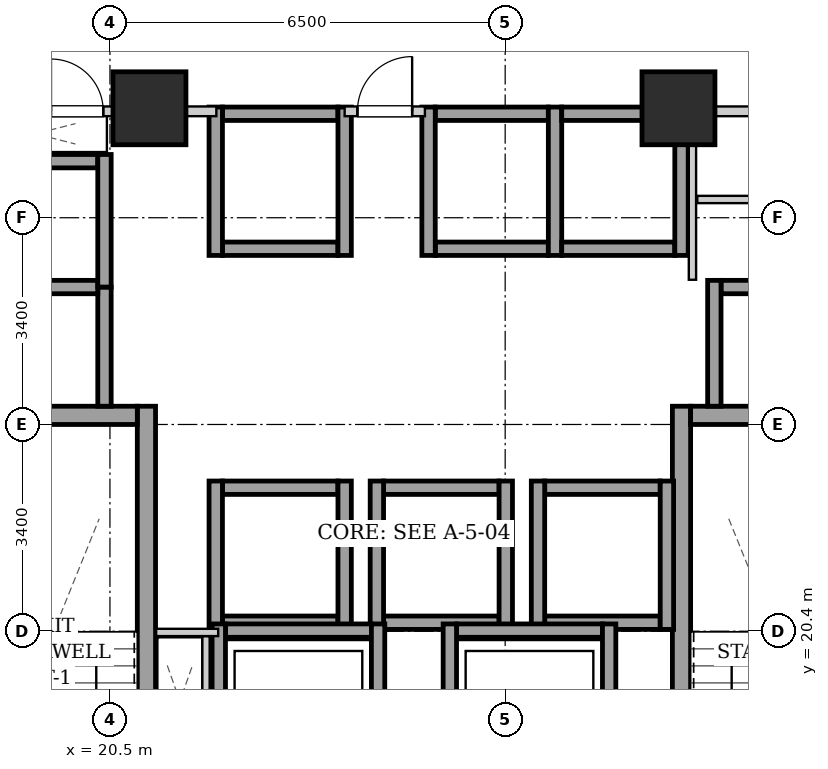
"""IFC4 building model, lengths in metres.
Left out: names, types, materials, properties, quantities, classifications, styles, units other than length and angle.
Written with IfcOpenShell. Run it as: python <this file> out.ifc"""

import sys

from ifc_helpers import new_model, si_unit, direction, frame, frame_2d, origin, origin_2d, place, context, subcontext, project, spatial, rectangle, extrude, element, fill, save


model = new_model("IFC4")
c1 = context("Model", 3, precision=1e-05, world=origin(), true_north=direction((0.0, 1.0)))
c2 = subcontext(c1, "Body", "Model", "MODEL_VIEW")
j1 = project(units=[si_unit("LENGTHUNIT", "METRE"), si_unit("PLANEANGLEUNIT", "RADIAN")], contexts=[c1])
p1 = place(None, origin())
s1 = spatial("IfcSite", under=j1, at=p1, CompositionType="ELEMENT")
p2 = place(p1, origin())
s2 = spatial("IfcBuilding", under=s1, at=p2, CompositionType="ELEMENT")
p3 = place(p2, frame((0.0, 0.0, 16.0)))
s3 = spatial("IfcBuildingStorey", under=s2, at=p3, CompositionType="ELEMENT", Elevation=16.0)
for number, where, z_axis, x_axis in (
    (1, (21.15, 29.0, 0.0), (0.0, 0.0, 1.0), (1.0, 0.0, 0.0)),
    (2, (29.85, 29.0, 0.0), (0.0, 0.0, 1.0), (1.0, 0.0, 0.0)),
):
    element("IfcColumn", number, at=place(p3, frame(where, z_axis=z_axis, x_axis=x_axis)), inside=s3, PredefinedType="COLUMN", context=c2, shape_type="SweptSolid", body=[
        extrude(rectangle(XDim=1.2, YDim=1.2, at=origin_2d()), origin(), (0.0, 0.0, 1.0), 4.8),
    ])
p4 = place(p3, frame((21.1, 15.1, 0.0), z_axis=(0.0, 0.0, 1.0), x_axis=(0.0, 1.0, 0.0)))
e3 = element("IfcWall", 3, at=p4, inside=s3, PredefinedType="SHEAR", context=c2, shape_type="SweptSolid", body=[
    extrude(rectangle(XDim=9.0, YDim=0.3, at=frame_2d((4.5, 0.0))), origin(), (0.0, 0.0, 1.0), 4.35),
])
p5 = place(p3, frame((18.1, 23.95, 0.0), z_axis=(0.0, 0.0, 1.0), x_axis=(1.0, 0.0, 0.0)))
e4 = element("IfcWall", 4, at=p5, inside=s3, PredefinedType="SHEAR", context=c2, shape_type="SweptSolid", body=[
    extrude(rectangle(XDim=2.85, YDim=0.3, at=frame_2d((1.425, 0.0))), origin(), (0.0, 0.0, 1.0), 4.35),
])
p6 = place(p3, frame((29.9, 15.1, 0.0), z_axis=(0.0, 0.0, 1.0), x_axis=(0.0, 1.0, 0.0)))
e5 = element("IfcWall", 5, at=p6, inside=s3, PredefinedType="SHEAR", context=c2, shape_type="SweptSolid", body=[
    extrude(rectangle(XDim=9.0, YDim=0.3, at=frame_2d((4.5, 0.0))), origin(), (0.0, 0.0, 1.0), 4.35),
])
p7 = place(p3, frame((30.05, 23.95, 0.0), z_axis=(0.0, 0.0, 1.0), x_axis=(1.0, 0.0, 0.0)))
e6 = element("IfcWall", 6, at=p7, inside=s3, PredefinedType="SHEAR", context=c2, shape_type="SweptSolid", body=[
    extrude(rectangle(XDim=2.85, YDim=0.3, at=frame_2d((1.425, 0.0))), origin(), (0.0, 0.0, 1.0), 4.35),
])
for number, where, z_axis, x_axis in (
    (7, (22.35, 26.69, 0.0), (0.0, 0.0, 1.0), (1.0, 0.0, 0.0)),
    (8, (22.35, 28.91, 0.0), (0.0, 0.0, 1.0), (1.0, 0.0, 0.0)),
):
    element("IfcWall", number, at=place(p3, frame(where, z_axis=z_axis, x_axis=x_axis)), inside=s3, PredefinedType="SHEAR", context=c2, shape_type="SweptSolid", body=[
        extrude(rectangle(XDim=1.9, YDim=0.22, at=frame_2d((0.95, 0.0))), origin(), (0.0, 0.0, 1.0), 4.35),
    ])
for number, where, z_axis, x_axis in (
    (9, (22.24, 26.58, 0.0), (0.0, 0.0, 1.0), (0.0, 1.0, 0.0)),
    (10, (24.36, 26.58, 0.0), (0.0, 0.0, 1.0), (0.0, 1.0, 0.0)),
):
    element("IfcWall", number, at=place(p3, frame(where, z_axis=z_axis, x_axis=x_axis)), inside=s3, PredefinedType="SHEAR", context=c2, shape_type="SweptSolid", body=[
        extrude(rectangle(XDim=2.44, YDim=0.22, at=frame_2d((1.22, 0.0))), origin(), (0.0, 0.0, 1.0), 4.35),
    ])
for number, where, z_axis, x_axis in (
    (11, (25.85, 26.69, 0.0), (0.0, 0.0, 1.0), (1.0, 0.0, 0.0)),
    (12, (25.85, 28.91, 0.0), (0.0, 0.0, 1.0), (1.0, 0.0, 0.0)),
):
    element("IfcWall", number, at=place(p3, frame(where, z_axis=z_axis, x_axis=x_axis)), inside=s3, PredefinedType="SHEAR", context=c2, shape_type="SweptSolid", body=[
        extrude(rectangle(XDim=1.86, YDim=0.22, at=frame_2d((0.93, 0.0))), origin(), (0.0, 0.0, 1.0), 4.35),
    ])
for number, where, z_axis, x_axis in (
    (13, (25.74, 26.58, 0.0), (0.0, 0.0, 1.0), (0.0, 1.0, 0.0)),
    (14, (27.82, 26.58, 0.0), (0.0, 0.0, 1.0), (0.0, 1.0, 0.0)),
):
    element("IfcWall", number, at=place(p3, frame(where, z_axis=z_axis, x_axis=x_axis)), inside=s3, PredefinedType="SHEAR", context=c2, shape_type="SweptSolid", body=[
        extrude(rectangle(XDim=2.44, YDim=0.22, at=frame_2d((1.22, 0.0))), origin(), (0.0, 0.0, 1.0), 4.35),
    ])
for number, where, z_axis, x_axis in (
    (15, (27.93, 26.69, 0.0), (0.0, 0.0, 1.0), (1.0, 0.0, 0.0)),
    (16, (27.93, 28.91, 0.0), (0.0, 0.0, 1.0), (1.0, 0.0, 0.0)),
):
    element("IfcWall", number, at=place(p3, frame(where, z_axis=z_axis, x_axis=x_axis)), inside=s3, PredefinedType="SHEAR", context=c2, shape_type="SweptSolid", body=[
        extrude(rectangle(XDim=1.86, YDim=0.22, at=frame_2d((0.93, 0.0))), origin(), (0.0, 0.0, 1.0), 4.35),
    ])
p8 = place(p3, frame((29.9, 26.58, 0.0), z_axis=(0.0, 0.0, 1.0), x_axis=(0.0, 1.0, 0.0)))
e17 = element("IfcWall", 17, at=p8, inside=s3, PredefinedType="SHEAR", context=c2, shape_type="SweptSolid", body=[
    extrude(rectangle(XDim=2.44, YDim=0.22, at=frame_2d((1.22, 0.0))), origin(), (0.0, 0.0, 1.0), 4.35),
])
for number, where, z_axis, x_axis in (
    (18, (22.35, 20.54, 0.0), (0.0, 0.0, 1.0), (1.0, 0.0, 0.0)),
    (19, (22.35, 22.76, 0.0), (0.0, 0.0, 1.0), (1.0, 0.0, 0.0)),
):
    element("IfcWall", number, at=place(p3, frame(where, z_axis=z_axis, x_axis=x_axis)), inside=s3, PredefinedType="SHEAR", context=c2, shape_type="SweptSolid", body=[
        extrude(rectangle(XDim=1.9, YDim=0.22, at=frame_2d((0.95, 0.0))), origin(), (0.0, 0.0, 1.0), 4.35),
    ])
for number, where, z_axis, x_axis in (
    (20, (22.24, 20.43, 0.0), (0.0, 0.0, 1.0), (0.0, 1.0, 0.0)),
    (21, (24.36, 20.43, 0.0), (0.0, 0.0, 1.0), (0.0, 1.0, 0.0)),
):
    element("IfcWall", number, at=place(p3, frame(where, z_axis=z_axis, x_axis=x_axis)), inside=s3, PredefinedType="SHEAR", context=c2, shape_type="SweptSolid", body=[
        extrude(rectangle(XDim=2.44, YDim=0.22, at=frame_2d((1.22, 0.0))), origin(), (0.0, 0.0, 1.0), 4.35),
    ])
for number, where, z_axis, x_axis in (
    (22, (25.0, 20.54, 0.0), (0.0, 0.0, 1.0), (1.0, 0.0, 0.0)),
    (23, (25.0, 22.76, 0.0), (0.0, 0.0, 1.0), (1.0, 0.0, 0.0)),
):
    element("IfcWall", number, at=place(p3, frame(where, z_axis=z_axis, x_axis=x_axis)), inside=s3, PredefinedType="SHEAR", context=c2, shape_type="SweptSolid", body=[
        extrude(rectangle(XDim=1.9, YDim=0.22, at=frame_2d((0.95, 0.0))), origin(), (0.0, 0.0, 1.0), 4.35),
    ])
for number, where, z_axis, x_axis in (
    (24, (24.89, 20.43, 0.0), (0.0, 0.0, 1.0), (0.0, 1.0, 0.0)),
    (25, (27.01, 20.43, 0.0), (0.0, 0.0, 1.0), (0.0, 1.0, 0.0)),
):
    element("IfcWall", number, at=place(p3, frame(where, z_axis=z_axis, x_axis=x_axis)), inside=s3, PredefinedType="SHEAR", context=c2, shape_type="SweptSolid", body=[
        extrude(rectangle(XDim=2.44, YDim=0.22, at=frame_2d((1.22, 0.0))), origin(), (0.0, 0.0, 1.0), 4.35),
    ])
for number, where, z_axis, x_axis in (
    (26, (27.65, 20.54, 0.0), (0.0, 0.0, 1.0), (1.0, 0.0, 0.0)),
    (27, (27.65, 22.76, 0.0), (0.0, 0.0, 1.0), (1.0, 0.0, 0.0)),
):
    element("IfcWall", number, at=place(p3, frame(where, z_axis=z_axis, x_axis=x_axis)), inside=s3, PredefinedType="SHEAR", context=c2, shape_type="SweptSolid", body=[
        extrude(rectangle(XDim=1.9, YDim=0.22, at=frame_2d((0.95, 0.0))), origin(), (0.0, 0.0, 1.0), 4.35),
    ])
for number, where, z_axis, x_axis in (
    (28, (27.54, 20.43, 0.0), (0.0, 0.0, 1.0), (0.0, 1.0, 0.0)),
    (29, (29.66, 20.43, 0.0), (0.0, 0.0, 1.0), (0.0, 1.0, 0.0)),
):
    element("IfcWall", number, at=place(p3, frame(where, z_axis=z_axis, x_axis=x_axis)), inside=s3, PredefinedType="SHEAR", context=c2, shape_type="SweptSolid", body=[
        extrude(rectangle(XDim=2.44, YDim=0.22, at=frame_2d((1.22, 0.0))), origin(), (0.0, 0.0, 1.0), 4.35),
    ])
p9 = place(p3, frame((20.41, 24.1, 0.0), z_axis=(0.0, 0.0, 1.0), x_axis=(0.0, 1.0, 0.0)))
e30 = element("IfcWall", 30, at=p9, inside=s3, PredefinedType="SHEAR", context=c2, shape_type="SweptSolid", body=[
    extrude(rectangle(XDim=1.96, YDim=0.22, at=frame_2d((0.98, 0.0))), origin(), (0.0, 0.0, 1.0), 4.35),
])
for number, where, z_axis, x_axis in (
    (31, (18.4, 26.06, 0.0), (0.0, 0.0, 1.0), (1.0, 0.0, 0.0)),
    (32, (18.4, 28.13, 0.0), (0.0, 0.0, 1.0), (1.0, 0.0, 0.0)),
):
    element("IfcWall", number, at=place(p3, frame(where, z_axis=z_axis, x_axis=x_axis)), inside=s3, PredefinedType="SHEAR", context=c2, shape_type="SweptSolid", body=[
        extrude(rectangle(XDim=1.9, YDim=0.22, at=frame_2d((0.95, 0.0))), origin(), (0.0, 0.0, 1.0), 4.35),
    ])
p10 = place(p3, frame((20.41, 26.06, 0.0), z_axis=(0.0, 0.0, 1.0), x_axis=(0.0, 1.0, 0.0)))
e33 = element("IfcWall", 33, at=p10, inside=s3, PredefinedType="SHEAR", context=c2, shape_type="SweptSolid", body=[
    extrude(rectangle(XDim=2.18, YDim=0.22, at=frame_2d((1.09, 0.0))), origin(), (0.0, 0.0, 1.0), 4.35),
])
p11 = place(p3, frame((30.55, 26.06, 0.0), z_axis=(0.0, 0.0, 1.0), x_axis=(1.0, 0.0, 0.0)))
e34 = element("IfcWall", 34, at=p11, inside=s3, PredefinedType="SHEAR", context=c2, shape_type="SweptSolid", body=[
    extrude(rectangle(XDim=1.9, YDim=0.22, at=frame_2d((0.95, 0.0))), origin(), (0.0, 0.0, 1.0), 4.35),
])
p12 = place(p3, frame((30.44, 24.1, 0.0), z_axis=(0.0, 0.0, 1.0), x_axis=(0.0, 1.0, 0.0)))
e35 = element("IfcWall", 35, at=p12, inside=s3, PredefinedType="SHEAR", context=c2, shape_type="SweptSolid", body=[
    extrude(rectangle(XDim=2.07, YDim=0.22, at=frame_2d((1.035, 0.0))), origin(), (0.0, 0.0, 1.0), 4.35),
])
p13 = place(p3, frame((22.4, 20.41, 0.0), z_axis=(0.0, 0.0, 1.0), x_axis=(1.0, 0.0, 0.0)))
e36 = element("IfcWall", 36, at=p13, inside=s3, PredefinedType="SHEAR", context=c2, shape_type="SweptSolid", body=[
    extrude(rectangle(XDim=2.4, YDim=0.22, at=frame_2d((1.2, 0.0))), origin(), (0.0, 0.0, 1.0), 4.35),
])
for number, where, z_axis, x_axis in (
    (37, (22.29, 17.98, 0.0), (0.0, 0.0, 1.0), (0.0, 1.0, 0.0)),
    (38, (24.91, 17.98, 0.0), (0.0, 0.0, 1.0), (0.0, 1.0, 0.0)),
):
    element("IfcWall", number, at=place(p3, frame(where, z_axis=z_axis, x_axis=x_axis)), inside=s3, PredefinedType="SHEAR", context=c2, shape_type="SweptSolid", body=[
        extrude(rectangle(XDim=2.54, YDim=0.22, at=frame_2d((1.27, 0.0))), origin(), (0.0, 0.0, 1.0), 4.35),
    ])
p14 = place(p3, frame((26.2, 20.41, 0.0), z_axis=(0.0, 0.0, 1.0), x_axis=(1.0, 0.0, 0.0)))
e39 = element("IfcWall", 39, at=p14, inside=s3, PredefinedType="SHEAR", context=c2, shape_type="SweptSolid", body=[
    extrude(rectangle(XDim=2.4, YDim=0.22, at=frame_2d((1.2, 0.0))), origin(), (0.0, 0.0, 1.0), 4.35),
])
for number, where, z_axis, x_axis in (
    (40, (26.09, 17.98, 0.0), (0.0, 0.0, 1.0), (0.0, 1.0, 0.0)),
    (41, (28.71, 17.98, 0.0), (0.0, 0.0, 1.0), (0.0, 1.0, 0.0)),
):
    element("IfcWall", number, at=place(p3, frame(where, z_axis=z_axis, x_axis=x_axis)), inside=s3, PredefinedType="SHEAR", context=c2, shape_type="SweptSolid", body=[
        extrude(rectangle(XDim=2.54, YDim=0.22, at=frame_2d((1.27, 0.0))), origin(), (0.0, 0.0, 1.0), 4.35),
    ])
p15 = place(p3, frame((24.36, 28.95, 0.0), z_axis=(0.0, 0.0, 1.0), x_axis=(1.0, 0.0, 0.0)))
e42 = element("IfcWall", 42, at=p15, inside=s3, PredefinedType="PARTITIONING", context=c2, shape_type="SweptSolid", body=[
    extrude(rectangle(XDim=1.32, YDim=0.16, at=frame_2d((0.66, 0.0))), origin(), (0.0, 0.0, 1.0), 4.35),
])
p16 = place(p15, frame((0.21, 0.0, 0.0)))
e43 = element("IfcOpeningElement", 43, at=p16, cuts=e42, PredefinedType="OPENING", context=c2, shape_type="SweptSolid", body=[
    extrude(rectangle(XDim=0.9, YDim=2.05, at=frame_2d((0.45, 1.025))), frame((0.0, 0.09, 0.0), z_axis=(0.0, -1.0, 0.0), x_axis=(1.0, 0.0, 0.0)), (0.0, 0.0, 1.0), 0.18),
])
p17 = place(p3, frame((17.96, 28.95, 0.0), z_axis=(0.0, 0.0, 1.0), x_axis=(1.0, 0.0, 0.0)))
e44 = element("IfcWall", 44, at=p17, inside=s3, PredefinedType="PARTITIONING", context=c2, shape_type="SweptSolid", body=[
    extrude(rectangle(XDim=4.29, YDim=0.16, at=frame_2d((2.145, 0.0))), origin(), (0.0, 0.0, 1.0), 4.35),
])
p18 = place(p17, frame((1.57, 0.0, 0.0)))
e45 = element("IfcOpeningElement", 45, at=p18, cuts=e44, PredefinedType="OPENING", context=c2, shape_type="SweptSolid", body=[
    extrude(rectangle(XDim=0.86, YDim=2.05, at=frame_2d((0.43, 1.025))), frame((0.0, 0.09, 0.0), z_axis=(0.0, -1.0, 0.0), x_axis=(1.0, 0.0, 0.0)), (0.0, 0.0, 1.0), 0.18),
])
p19 = place(p3, frame((22.08, 18.2, 0.0), z_axis=(0.0, 0.0, 1.0), x_axis=(0.0, 1.0, 0.0)))
e46 = element("IfcWall", 46, at=p19, inside=s3, PredefinedType="PARTITIONING", context=c2, shape_type="SweptSolid", body=[
    extrude(rectangle(XDim=2.12, YDim=0.12, at=frame_2d((1.06, 0.0))), origin(), (0.0, 0.0, 1.0), 4.35),
])
p20 = place(p3, frame((22.28, 20.38, 0.0), z_axis=(0.0, 0.0, 1.0), x_axis=(-1.0, 0.0, 0.0)))
e47 = element("IfcWall", 47, at=p20, inside=s3, PredefinedType="PARTITIONING", context=c2, shape_type="SweptSolid", body=[
    extrude(rectangle(XDim=1.02, YDim=0.12, at=frame_2d((0.51, 0.0))), origin(), (0.0, 0.0, 1.0), 4.35),
])
p21 = place(p3, frame((30.08, 26.18, 0.0), z_axis=(0.0, 0.0, 1.0), x_axis=(0.0, 1.0, 0.0)))
e48 = element("IfcWall", 48, at=p21, inside=s3, PredefinedType="PARTITIONING", context=c2, shape_type="SweptSolid", body=[
    extrude(rectangle(XDim=2.68, YDim=0.12, at=frame_2d((1.34, 0.0))), origin(), (0.0, 0.0, 1.0), 4.35),
])
p22 = place(p3, frame((30.16, 27.5, 0.0), z_axis=(0.0, 0.0, 1.0), x_axis=(1.0, 0.0, 0.0)))
e49 = element("IfcWall", 49, at=p22, inside=s3, PredefinedType="PARTITIONING", context=c2, shape_type="SweptSolid", body=[
    extrude(rectangle(XDim=2.88, YDim=0.12, at=frame_2d((1.44, 0.0))), origin(), (0.0, 0.0, 1.0), 4.35),
])
p23 = place(p22, frame((0.97, 0.0, 0.0)))
e50 = element("IfcOpeningElement", 50, at=p23, cuts=e49, PredefinedType="OPENING", context=c2, shape_type="SweptSolid", body=[
    extrude(rectangle(XDim=0.86, YDim=2.05, at=frame_2d((0.43, 1.025))), frame((0.0, 0.07, 0.0), z_axis=(0.0, -1.0, 0.0), x_axis=(1.0, 0.0, 0.0)), (0.0, 0.0, 1.0), 0.14),
])
p24 = place(p3, frame((30.08, 28.95, 0.0), z_axis=(0.0, 0.0, 1.0), x_axis=(1.0, 0.0, 0.0)))
e51 = element("IfcWall", 51, at=p24, inside=s3, PredefinedType="PARTITIONING", context=c2, shape_type="SweptSolid", body=[
    extrude(rectangle(XDim=2.96, YDim=0.16, at=frame_2d((1.48, 0.0))), origin(), (0.0, 0.0, 1.0), 4.35),
])
p25 = place(p24, frame((1.045, 0.0, 0.0)))
e52 = element("IfcOpeningElement", 52, at=p25, cuts=e51, PredefinedType="OPENING", context=c2, shape_type="SweptSolid", body=[
    extrude(rectangle(XDim=0.86, YDim=2.05, at=frame_2d((0.43, 1.025))), frame((0.0, 0.09, 0.0), z_axis=(0.0, -1.0, 0.0), x_axis=(1.0, 0.0, 0.0)), (0.0, 0.0, 1.0), 0.18),
])
p26 = place(p16, origin())
e53 = element("IfcDoor", 53, at=p26, inside=s3, OperationType="SINGLE_SWING_RIGHT", PredefinedType="DOOR", context=c2, shape_type="SweptSolid", body=[
    extrude(rectangle(XDim=0.9, YDim=2.05, at=frame_2d((0.45, 1.025))), frame((0.0, 0.025, 0.0), z_axis=(0.0, -1.0, 0.0), x_axis=(1.0, 0.0, 0.0)), (0.0, 0.0, 1.0), 0.05),
])
fill(e43, e53)
p27 = place(p18, origin())
e54 = element("IfcDoor", 54, at=p27, inside=s3, OperationType="SINGLE_SWING_LEFT", PredefinedType="DOOR", context=c2, shape_type="SweptSolid", body=[
    extrude(rectangle(XDim=0.86, YDim=2.05, at=frame_2d((0.43, 1.025))), frame((0.0, 0.025, 0.0), z_axis=(0.0, -1.0, 0.0), x_axis=(1.0, 0.0, 0.0)), (0.0, 0.0, 1.0), 0.05),
])
fill(e45, e54)
save(model, sys.argv[1])
